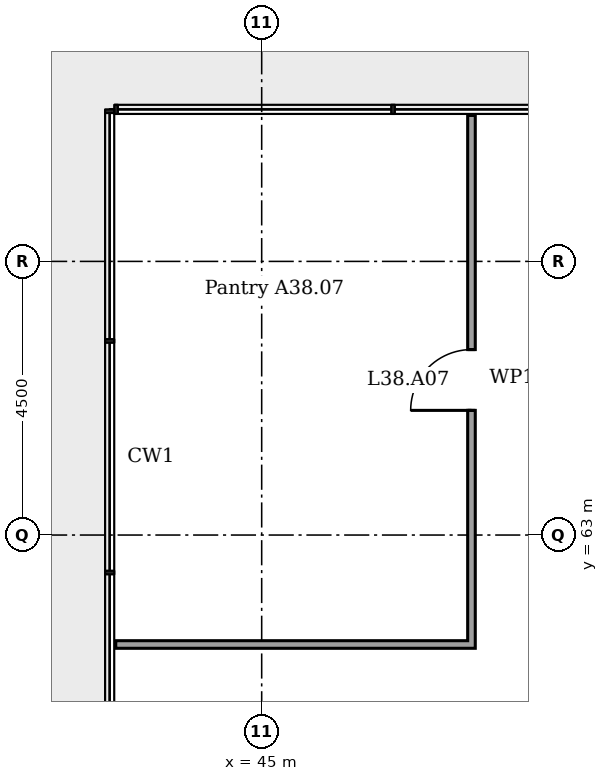
"""IFC4 building model, lengths in metres.
Left out: names, types, materials, properties, quantities, classifications, styles, units other than length and angle.
Written with IfcOpenShell. Run it as: python <this file> out.ifc"""

import sys

from ifc_helpers import new_model, si_unit, direction, frame, frame_2d, origin, place, context, subcontext, project, spatial, rectangle, extrude, element, fill, save


model = new_model("IFC4")
c1 = context("Model", 3, precision=1e-05, world=origin(), true_north=direction((0.0, 1.0)))
c2 = subcontext(c1, "Body", "Model", "MODEL_VIEW")
j1 = project(units=[si_unit("LENGTHUNIT", "METRE"), si_unit("PLANEANGLEUNIT", "RADIAN")], contexts=[c1])
p1 = place(None, origin())
s1 = spatial("IfcSite", under=j1, at=p1, CompositionType="ELEMENT")
p2 = place(p1, origin())
s2 = spatial("IfcBuilding", under=s1, at=p2, CompositionType="ELEMENT")
p3 = place(p2, frame((0.0, 0.0, 154.6)))
s3 = spatial("IfcBuildingStorey", under=s2, at=p3, CompositionType="ELEMENT", Elevation=154.6)
p4 = place(p3, frame((42.6, 61.2, 0.0)))
e1 = element("IfcWall", 1, at=p4, inside=s3, PredefinedType="PARTITIONING", context=c2, shape_type="SweptSolid", body=[
    extrude(rectangle(XDim=5.912, YDim=0.125, at=frame_2d((2.956, 0.0))), origin(), (0.0, 0.0, 1.0), 3.45),
])
p5 = place(p3, frame((48.45, 61.262, 0.0), z_axis=(0.0, 0.0, 1.0), x_axis=(0.0, 1.0, 0.0)))
e2 = element("IfcWall", 2, at=p5, inside=s3, PredefinedType="PARTITIONING", context=c2, shape_type="SweptSolid", body=[
    extrude(rectangle(XDim=8.637, YDim=0.125, at=frame_2d((4.319, 0.0))), origin(), (0.0, 0.0, 1.0), 3.45),
])
p6 = place(p5, frame((3.788, 0.0, 0.0)))
e3 = element("IfcOpeningElement", 3, at=p6, cuts=e2, PredefinedType="OPENING", context=c2, shape_type="SweptSolid", body=[
    extrude(rectangle(XDim=1.0, YDim=2.1, at=frame_2d((0.5, 1.05))), frame((0.0, 0.073, 0.0), z_axis=(0.0, -1.0, 0.0), x_axis=(1.0, 0.0, 0.0)), (0.0, 0.0, 1.0), 0.145),
])
p7 = place(p6, origin())
e4 = element("IfcDoor", 4, at=p7, inside=s3, OperationType="SINGLE_SWING_RIGHT", PredefinedType="DOOR", context=c2, shape_type="SweptSolid", body=[
    extrude(rectangle(XDim=1.0, YDim=2.1, at=frame_2d((0.5, 1.05))), frame((0.0, 0.025, 0.0), z_axis=(0.0, -1.0, 0.0), x_axis=(1.0, 0.0, 0.0)), (0.0, 0.0, 1.0), 0.05),
])
fill(e3, e4)
save(model, sys.argv[1])
